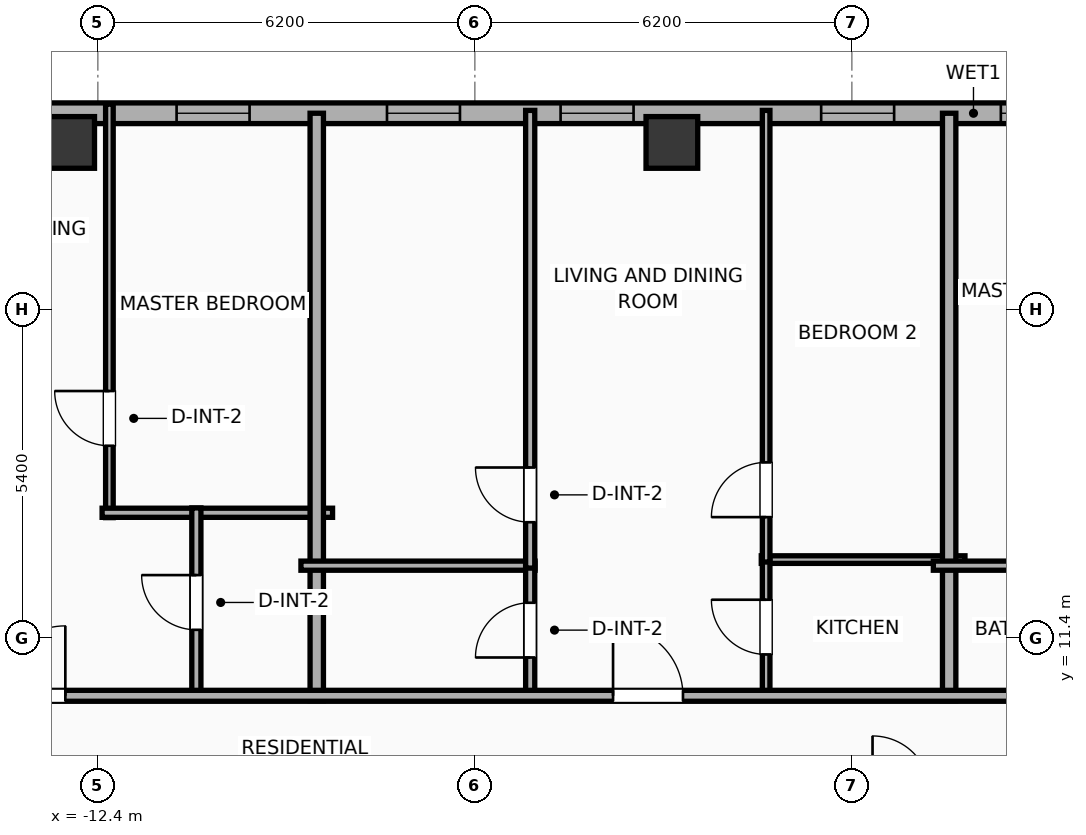
"""IFC4 building model, lengths in metres.
Left out: names, types, materials, properties, quantities, classifications, styles, units other than length and angle.
Written with IfcOpenShell. Run it as: python <this file> out.ifc"""

import sys

from ifc_helpers import new_model, si_unit, direction, frame, frame_2d, origin, origin_2d, place, context, subcontext, project, spatial, rectangle, hollow_rectangle, extrude, element, fill, save


model = new_model("IFC4")
c1 = context("Model", 3, precision=1e-05, world=origin(), true_north=direction((0.0, 1.0)))
c2 = subcontext(c1, "Body", "Model", "MODEL_VIEW")
j1 = project(units=[si_unit("LENGTHUNIT", "METRE"), si_unit("PLANEANGLEUNIT", "RADIAN")], contexts=[c1])
p1 = place(None, origin())
s1 = spatial("IfcSite", under=j1, at=p1, CompositionType="ELEMENT")
p2 = place(p1, origin())
s2 = spatial("IfcBuilding", under=s1, at=p2, CompositionType="ELEMENT")
p3 = place(p2, frame((0.0, 0.0, 250.9)))
s3 = spatial("IfcBuildingStorey", under=s2, at=p3, CompositionType="ELEMENT", Elevation=250.9)
for number, where, z_axis, x_axis in (
    (1, (-2.96, 19.55, 0.0), (0.0, 0.0, 1.0), (1.0, 0.0, 0.0)),
    (2, (-12.88, 19.55, 0.0), (0.0, 0.0, 1.0), (1.0, 0.0, 0.0)),
):
    element("IfcColumn", number, at=place(p3, frame(where, z_axis=z_axis, x_axis=x_axis)), inside=s3, PredefinedType="COLUMN", context=c2, shape_type="SweptSolid", body=[
        extrude(hollow_rectangle(XDim=0.85, YDim=0.85, WallThickness=0.028, at=origin_2d()), origin(), (0.0, 0.0, 1.0), 3.865),
    ])
p4 = place(p3, frame((-22.783, 20.03, 0.0), z_axis=(0.0, 0.0, 1.0), x_axis=(1.0, 0.0, 0.0)))
e3 = element("IfcWall", 3, at=p4, inside=s3, PredefinedType="ELEMENTEDWALL", context=c2, shape_type="SweptSolid", body=[
    extrude(rectangle(XDim=49.566, YDim=0.34, at=frame_2d((24.783, 0.0))), origin(), (0.0, 0.0, 1.0), 2.39),
])
p5 = place(p4, frame((25.233, 0.0, 0.75)))
e4 = element("IfcOpeningElement", 4, at=p5, cuts=e3, PredefinedType="OPENING", context=c2, shape_type="SweptSolid", body=[
    extrude(rectangle(XDim=2.4, YDim=1.45, at=frame_2d((1.2, 0.725))), frame((0.0, 0.18, 0.0), z_axis=(0.0, -1.0, 0.0), x_axis=(1.0, 0.0, 0.0)), (0.0, 0.0, 1.0), 0.36),
])
p6 = place(p4, frame((41.756, 0.0, 0.75)))
e5 = element("IfcOpeningElement", 5, at=p6, cuts=e3, PredefinedType="OPENING", context=c2, shape_type="SweptSolid", body=[
    extrude(rectangle(XDim=2.4, YDim=1.45, at=frame_2d((1.2, 0.725))), frame((0.0, 0.18, 0.0), z_axis=(0.0, -1.0, 0.0), x_axis=(1.0, 0.0, 0.0)), (0.0, 0.0, 1.0), 0.36),
])
p7 = place(p4, frame((1.637, 0.0, 0.55)))
e6 = element("IfcOpeningElement", 6, at=p7, cuts=e3, PredefinedType="OPENING", context=c2, shape_type="SweptSolid", body=[
    extrude(rectangle(XDim=1.2, YDim=1.15, at=frame_2d((0.6, 0.575))), frame((0.0, 0.18, 0.0), z_axis=(0.0, -1.0, 0.0), x_axis=(1.0, 0.0, 0.0)), (0.0, 0.0, 1.0), 0.36),
])
p8 = place(p4, frame((8.019, 0.0, 0.55)))
e7 = element("IfcOpeningElement", 7, at=p8, cuts=e3, PredefinedType="OPENING", context=c2, shape_type="SweptSolid", body=[
    extrude(rectangle(XDim=1.2, YDim=1.15, at=frame_2d((0.6, 0.575))), frame((0.0, 0.18, 0.0), z_axis=(0.0, -1.0, 0.0), x_axis=(1.0, 0.0, 0.0)), (0.0, 0.0, 1.0), 0.36),
])
p9 = place(p4, frame((4.524, 0.0, 0.55)))
e8 = element("IfcOpeningElement", 8, at=p9, cuts=e3, PredefinedType="OPENING", context=c2, shape_type="SweptSolid", body=[
    extrude(rectangle(XDim=1.2, YDim=1.15, at=frame_2d((0.6, 0.575))), frame((0.0, 0.18, 0.0), z_axis=(0.0, -1.0, 0.0), x_axis=(1.0, 0.0, 0.0)), (0.0, 0.0, 1.0), 0.36),
])
p10 = place(p4, frame((11.678, 0.0, 0.55)))
e9 = element("IfcOpeningElement", 9, at=p10, cuts=e3, PredefinedType="OPENING", context=c2, shape_type="SweptSolid", body=[
    extrude(rectangle(XDim=1.2, YDim=1.15, at=frame_2d((0.6, 0.575))), frame((0.0, 0.18, 0.0), z_axis=(0.0, -1.0, 0.0), x_axis=(1.0, 0.0, 0.0)), (0.0, 0.0, 1.0), 0.36),
])
p11 = place(p4, frame((17.993, 0.0, 0.55)))
e10 = element("IfcOpeningElement", 10, at=p11, cuts=e3, PredefinedType="OPENING", context=c2, shape_type="SweptSolid", body=[
    extrude(rectangle(XDim=1.2, YDim=1.15, at=frame_2d((0.6, 0.575))), frame((0.0, 0.18, 0.0), z_axis=(0.0, -1.0, 0.0), x_axis=(1.0, 0.0, 0.0)), (0.0, 0.0, 1.0), 0.36),
])
p12 = place(p4, frame((15.138, 0.0, 0.55)))
e11 = element("IfcOpeningElement", 11, at=p12, cuts=e3, PredefinedType="OPENING", context=c2, shape_type="SweptSolid", body=[
    extrude(rectangle(XDim=1.2, YDim=1.15, at=frame_2d((0.6, 0.575))), frame((0.0, 0.18, 0.0), z_axis=(0.0, -1.0, 0.0), x_axis=(1.0, 0.0, 0.0)), (0.0, 0.0, 1.0), 0.36),
])
p13 = place(p4, frame((22.278, 0.0, 0.55)))
e12 = element("IfcOpeningElement", 12, at=p13, cuts=e3, PredefinedType="OPENING", context=c2, shape_type="SweptSolid", body=[
    extrude(rectangle(XDim=1.2, YDim=1.15, at=frame_2d((0.6, 0.575))), frame((0.0, 0.18, 0.0), z_axis=(0.0, -1.0, 0.0), x_axis=(1.0, 0.0, 0.0)), (0.0, 0.0, 1.0), 0.36),
])
p14 = place(p4, frame((30.384, 0.0, 0.55)))
e13 = element("IfcOpeningElement", 13, at=p14, cuts=e3, PredefinedType="OPENING", context=c2, shape_type="SweptSolid", body=[
    extrude(rectangle(XDim=0.85, YDim=1.15, at=frame_2d((0.425, 0.575))), frame((0.0, 0.18, 0.0), z_axis=(0.0, -1.0, 0.0), x_axis=(1.0, 0.0, 0.0)), (0.0, 0.0, 1.0), 0.36),
])
p15 = place(p4, frame((32.603, 0.0, 0.55)))
e14 = element("IfcOpeningElement", 14, at=p15, cuts=e3, PredefinedType="OPENING", context=c2, shape_type="SweptSolid", body=[
    extrude(rectangle(XDim=1.2, YDim=1.15, at=frame_2d((0.6, 0.575))), frame((0.0, 0.18, 0.0), z_axis=(0.0, -1.0, 0.0), x_axis=(1.0, 0.0, 0.0)), (0.0, 0.0, 1.0), 0.36),
])
p16 = place(p4, frame((37.223, 0.0, 0.55)))
e15 = element("IfcOpeningElement", 15, at=p16, cuts=e3, PredefinedType="OPENING", context=c2, shape_type="SweptSolid", body=[
    extrude(rectangle(XDim=1.2, YDim=1.15, at=frame_2d((0.6, 0.575))), frame((0.0, 0.18, 0.0), z_axis=(0.0, -1.0, 0.0), x_axis=(1.0, 0.0, 0.0)), (0.0, 0.0, 1.0), 0.36),
])
p17 = place(p4, frame((45.099, 0.0, 0.55)))
e16 = element("IfcOpeningElement", 16, at=p17, cuts=e3, PredefinedType="OPENING", context=c2, shape_type="SweptSolid", body=[
    extrude(rectangle(XDim=1.2, YDim=1.15, at=frame_2d((0.6, 0.575))), frame((0.0, 0.18, 0.0), z_axis=(0.0, -1.0, 0.0), x_axis=(1.0, 0.0, 0.0)), (0.0, 0.0, 1.0), 0.36),
])
p18 = place(p4, frame((47.209, 0.0, 0.55)))
e17 = element("IfcOpeningElement", 17, at=p18, cuts=e3, PredefinedType="OPENING", context=c2, shape_type="SweptSolid", body=[
    extrude(rectangle(XDim=1.2, YDim=1.15, at=frame_2d((0.6, 0.575))), frame((0.0, 0.18, 0.0), z_axis=(0.0, -1.0, 0.0), x_axis=(1.0, 0.0, 0.0)), (0.0, 0.0, 1.0), 0.36),
])
p19 = place(p3, frame((-12.21, 13.38, 0.0), z_axis=(0.0, 0.0, 1.0), x_axis=(0.0, 1.0, 0.0)))
e18 = element("IfcWall", 18, at=p19, inside=s3, PredefinedType="PARTITIONING", context=c2, shape_type="SweptSolid", body=[
    extrude(rectangle(XDim=6.8, YDim=0.125, at=frame_2d((3.4, 0.0))), origin(), (0.0, 0.0, 1.0), 2.39),
])
p20 = place(p19, frame((1.182, 0.0, 0.0)))
e19 = element("IfcOpeningElement", 19, at=p20, cuts=e18, PredefinedType="OPENING", context=c2, shape_type="SweptSolid", body=[
    extrude(rectangle(XDim=0.9, YDim=2.05, at=frame_2d((0.45, 1.025))), frame((0.0, 0.073, 0.0), z_axis=(0.0, -1.0, 0.0), x_axis=(1.0, 0.0, 0.0)), (0.0, 0.0, 1.0), 0.145),
])
p21 = place(p3, frame((-12.33, 13.46, 0.0), z_axis=(0.0, 0.0, 1.0), x_axis=(1.0, 0.0, 0.0)))
e20 = element("IfcWall", 20, at=p21, inside=s3, PredefinedType="PLUMBINGWALL", context=c2, shape_type="SweptSolid", body=[
    extrude(rectangle(XDim=3.79, YDim=0.15, at=frame_2d((1.895, 0.0))), origin(), (0.0, 0.0, 1.0), 3.5),
])
p22 = place(p3, frame((-10.78, 10.43, 0.0), z_axis=(0.0, 0.0, 1.0), x_axis=(0.0, 1.0, 0.0)))
e21 = element("IfcWall", 21, at=p22, inside=s3, PredefinedType="PLUMBINGWALL", context=c2, shape_type="SweptSolid", body=[
    extrude(rectangle(XDim=3.11, YDim=0.15, at=frame_2d((1.555, 0.0))), origin(), (0.0, 0.0, 1.0), 3.5),
])
p23 = place(p22, frame((1.105, 0.0, 0.0)))
e22 = element("IfcOpeningElement", 22, at=p23, cuts=e21, PredefinedType="OPENING", context=c2, shape_type="SweptSolid", body=[
    extrude(rectangle(XDim=0.9, YDim=2.05, at=frame_2d((0.45, 1.025))), frame((0.0, 0.085, 0.0), z_axis=(0.0, -1.0, 0.0), x_axis=(1.0, 0.0, 0.0)), (0.0, 0.0, 1.0), 0.17),
])
p24 = place(p3, frame((-8.8, 10.37, 0.0), z_axis=(0.0, 0.0, 1.0), x_axis=(0.0, 1.0, 0.0)))
e23 = element("IfcWall", 23, at=p24, inside=s3, PredefinedType="PARTITIONING", context=c2, shape_type="SweptSolid", body=[
    extrude(rectangle(XDim=9.66, YDim=0.22, at=frame_2d((4.83, 0.0))), origin(), (0.0, 0.0, 1.0), 3.5),
])
p25 = place(p3, frame((-9.06, 12.59, 0.0), z_axis=(0.0, 0.0, 1.0), x_axis=(1.0, 0.0, 0.0)))
e24 = element("IfcWall", 24, at=p25, inside=s3, PredefinedType="PLUMBINGWALL", context=c2, shape_type="SweptSolid", body=[
    extrude(rectangle(XDim=3.85, YDim=0.15, at=frame_2d((1.925, 0.0))), origin(), (0.0, 0.0, 1.0), 3.5),
])
p26 = place(p3, frame((-1.49, 12.69, 0.0), z_axis=(0.0, 0.0, 1.0), x_axis=(1.0, 0.0, 0.0)))
e25 = element("IfcWall", 25, at=p26, inside=s3, PredefinedType="PARTITIONING", context=c2, shape_type="SweptSolid", body=[
    extrude(rectangle(XDim=3.35, YDim=0.125, at=frame_2d((1.675, 0.0))), origin(), (0.0, 0.0, 1.0), 3.5),
])
p27 = place(p3, frame((-5.29, 10.43, 0.0), z_axis=(0.0, 0.0, 1.0), x_axis=(0.0, 1.0, 0.0)))
e26 = element("IfcWall", 26, at=p27, inside=s3, PredefinedType="PLUMBINGWALL", context=c2, shape_type="SweptSolid", body=[
    extrude(rectangle(XDim=2.2, YDim=0.15, at=frame_2d((1.1, 0.0))), origin(), (0.0, 0.0, 1.0), 2.39),
])
p28 = place(p27, frame((0.65, 0.0, 0.0)))
e27 = element("IfcOpeningElement", 27, at=p28, cuts=e26, PredefinedType="OPENING", context=c2, shape_type="SweptSolid", body=[
    extrude(rectangle(XDim=0.9, YDim=2.05, at=frame_2d((0.45, 1.025))), frame((0.0, 0.085, 0.0), z_axis=(0.0, -1.0, 0.0), x_axis=(1.0, 0.0, 0.0)), (0.0, 0.0, 1.0), 0.17),
])
p29 = place(p3, frame((-5.29, 12.55, 0.0), z_axis=(0.0, 0.0, 1.0), x_axis=(0.0, 1.0, 0.0)))
e28 = element("IfcWall", 28, at=p29, inside=s3, PredefinedType="PLUMBINGWALL", context=c2, shape_type="SweptSolid", body=[
    extrude(rectangle(XDim=7.527, YDim=0.15, at=frame_2d((3.763, 0.0))), origin(), (0.0, 0.0, 1.0), 2.39),
])
p30 = place(p29, frame((0.754, 0.0, 0.0)))
e29 = element("IfcOpeningElement", 29, at=p30, cuts=e28, PredefinedType="OPENING", context=c2, shape_type="SweptSolid", body=[
    extrude(rectangle(XDim=0.9, YDim=2.05, at=frame_2d((0.45, 1.025))), frame((0.0, 0.085, 0.0), z_axis=(0.0, -1.0, 0.0), x_axis=(1.0, 0.0, 0.0)), (0.0, 0.0, 1.0), 0.17),
])
p31 = place(p3, frame((-1.41, 10.43, 0.0), z_axis=(0.0, 0.0, 1.0), x_axis=(0.0, 1.0, 0.0)))
e30 = element("IfcWall", 30, at=p31, inside=s3, PredefinedType="PARTITIONING", context=c2, shape_type="SweptSolid", body=[
    extrude(rectangle(XDim=2.3, YDim=0.125, at=frame_2d((1.15, 0.0))), origin(), (0.0, 0.0, 1.0), 3.5),
])
p32 = place(p31, frame((0.7, 0.0, 0.0)))
e31 = element("IfcOpeningElement", 31, at=p32, cuts=e30, PredefinedType="OPENING", context=c2, shape_type="SweptSolid", body=[
    extrude(rectangle(XDim=0.9, YDim=2.05, at=frame_2d((0.45, 1.025))), frame((0.0, 0.073, 0.0), z_axis=(0.0, -1.0, 0.0), x_axis=(1.0, 0.0, 0.0)), (0.0, 0.0, 1.0), 0.145),
])
p33 = place(p3, frame((-1.41, 12.65, 0.0), z_axis=(0.0, 0.0, 1.0), x_axis=(0.0, 1.0, 0.0)))
e32 = element("IfcWall", 32, at=p33, inside=s3, PredefinedType="PARTITIONING", context=c2, shape_type="SweptSolid", body=[
    extrude(rectangle(XDim=7.427, YDim=0.125, at=frame_2d((3.713, 0.0))), origin(), (0.0, 0.0, 1.0), 3.5),
])
p34 = place(p33, frame((0.738, 0.0, 0.0)))
e33 = element("IfcOpeningElement", 33, at=p34, cuts=e32, PredefinedType="OPENING", context=c2, shape_type="SweptSolid", body=[
    extrude(rectangle(XDim=0.9, YDim=2.05, at=frame_2d((0.45, 1.025))), frame((0.0, 0.073, 0.0), z_axis=(0.0, -1.0, 0.0), x_axis=(1.0, 0.0, 0.0)), (0.0, 0.0, 1.0), 0.145),
])
p35 = place(p3, frame((1.6, 10.37, 0.0), z_axis=(0.0, 0.0, 1.0), x_axis=(0.0, 1.0, 0.0)))
e34 = element("IfcWall", 34, at=p35, inside=s3, PredefinedType="PARTITIONING", context=c2, shape_type="SweptSolid", body=[
    extrude(rectangle(XDim=9.66, YDim=0.22, at=frame_2d((4.83, 0.0))), origin(), (0.0, 0.0, 1.0), 3.5),
])
p36 = place(p3, frame((1.34, 12.59, 0.0), z_axis=(0.0, 0.0, 1.0), x_axis=(1.0, 0.0, 0.0)))
e35 = element("IfcWall", 35, at=p36, inside=s3, PredefinedType="PLUMBINGWALL", context=c2, shape_type="SweptSolid", body=[
    extrude(rectangle(XDim=3.792, YDim=0.15, at=frame_2d((1.896, 0.0))), origin(), (0.0, 0.0, 1.0), 3.5),
])
p37 = place(p3, frame((-26.23, 10.45, 0.0), z_axis=(0.0, 0.0, 1.0), x_axis=(1.0, 0.0, 0.0)))
e36 = element("IfcWall", 36, at=p37, inside=s3, PredefinedType="PARTITIONING", context=c2, shape_type="SweptSolid", body=[
    extrude(rectangle(XDim=56.46, YDim=0.18, at=frame_2d((28.23, 0.0))), origin(), (0.0, 0.0, 1.0), 3.5),
])
p38 = place(p37, frame((3.072, 0.0, 0.0)))
e37 = element("IfcOpeningElement", 37, at=p38, cuts=e36, PredefinedType="OPENING", context=c2, shape_type="SweptSolid", body=[
    extrude(rectangle(XDim=1.15, YDim=2.05, at=frame_2d((0.575, 1.025))), frame((0.0, 0.1, 0.0), z_axis=(0.0, -1.0, 0.0), x_axis=(1.0, 0.0, 0.0)), (0.0, 0.0, 1.0), 0.2),
])
p39 = place(p37, frame((12.146, 0.0, 0.0)))
e38 = element("IfcOpeningElement", 38, at=p39, cuts=e36, PredefinedType="OPENING", context=c2, shape_type="SweptSolid", body=[
    extrude(rectangle(XDim=1.15, YDim=2.05, at=frame_2d((0.575, 1.025))), frame((0.0, 0.1, 0.0), z_axis=(0.0, -1.0, 0.0), x_axis=(1.0, 0.0, 0.0)), (0.0, 0.0, 1.0), 0.2),
])
p40 = place(p37, frame((22.302, 0.0, 0.0)))
e39 = element("IfcOpeningElement", 39, at=p40, cuts=e36, PredefinedType="OPENING", context=c2, shape_type="SweptSolid", body=[
    extrude(rectangle(XDim=1.15, YDim=2.05, at=frame_2d((0.575, 1.025))), frame((0.0, 0.1, 0.0), z_axis=(0.0, -1.0, 0.0), x_axis=(1.0, 0.0, 0.0)), (0.0, 0.0, 1.0), 0.2),
])
p41 = place(p37, frame((32.601, 0.0, 0.0)))
e40 = element("IfcOpeningElement", 40, at=p41, cuts=e36, PredefinedType="OPENING", context=c2, shape_type="SweptSolid", body=[
    extrude(rectangle(XDim=1.15, YDim=2.05, at=frame_2d((0.575, 1.025))), frame((0.0, 0.1, 0.0), z_axis=(0.0, -1.0, 0.0), x_axis=(1.0, 0.0, 0.0)), (0.0, 0.0, 1.0), 0.2),
])
p42 = place(p37, frame((40.941, 0.0, 0.0)))
e41 = element("IfcOpeningElement", 41, at=p42, cuts=e36, PredefinedType="OPENING", context=c2, shape_type="SweptSolid", body=[
    extrude(rectangle(XDim=0.9, YDim=2.05, at=frame_2d((0.45, 1.025))), frame((0.0, 0.1, 0.0), z_axis=(0.0, -1.0, 0.0), x_axis=(1.0, 0.0, 0.0)), (0.0, 0.0, 1.0), 0.2),
])
p43 = place(p37, frame((45.559, 0.0, 0.0)))
e42 = element("IfcOpeningElement", 42, at=p43, cuts=e36, PredefinedType="OPENING", context=c2, shape_type="SweptSolid", body=[
    extrude(rectangle(XDim=1.15, YDim=2.05, at=frame_2d((0.575, 1.025))), frame((0.0, 0.1, 0.0), z_axis=(0.0, -1.0, 0.0), x_axis=(1.0, 0.0, 0.0)), (0.0, 0.0, 1.0), 0.2),
])
p44 = place(p37, frame((53.125, 0.0, 0.0)))
e43 = element("IfcOpeningElement", 43, at=p44, cuts=e36, PredefinedType="OPENING", context=c2, shape_type="SweptSolid", body=[
    extrude(rectangle(XDim=0.9, YDim=2.05, at=frame_2d((0.45, 1.025))), frame((0.0, 0.1, 0.0), z_axis=(0.0, -1.0, 0.0), x_axis=(1.0, 0.0, 0.0)), (0.0, 0.0, 1.0), 0.2),
])
p45 = place(p5, origin())
e44 = element("IfcWindow", 44, at=p45, inside=s3, PartitioningType="SINGLE_PANEL", PredefinedType="WINDOW", context=c2, shape_type="SweptSolid", body=[
    extrude(rectangle(XDim=2.4, YDim=1.45, at=frame_2d((1.2, 0.725))), frame((0.0, 0.03, 0.0), z_axis=(0.0, -1.0, 0.0), x_axis=(1.0, 0.0, 0.0)), (0.0, 0.0, 1.0), 0.06),
])
fill(e4, e44)
p46 = place(p10, origin())
e45 = element("IfcWindow", 45, at=p46, inside=s3, PartitioningType="SINGLE_PANEL", PredefinedType="WINDOW", context=c2, shape_type="SweptSolid", body=[
    extrude(rectangle(XDim=1.2, YDim=1.15, at=frame_2d((0.6, 0.575))), frame((0.0, 0.03, 0.0), z_axis=(0.0, -1.0, 0.0), x_axis=(1.0, 0.0, 0.0)), (0.0, 0.0, 1.0), 0.06),
])
fill(e9, e45)
p47 = place(p11, origin())
e46 = element("IfcWindow", 46, at=p47, inside=s3, PartitioningType="SINGLE_PANEL", PredefinedType="WINDOW", context=c2, shape_type="SweptSolid", body=[
    extrude(rectangle(XDim=1.2, YDim=1.15, at=frame_2d((0.6, 0.575))), frame((0.0, 0.03, 0.0), z_axis=(0.0, -1.0, 0.0), x_axis=(1.0, 0.0, 0.0)), (0.0, 0.0, 1.0), 0.06),
])
fill(e10, e46)
p48 = place(p12, origin())
e47 = element("IfcWindow", 47, at=p48, inside=s3, PartitioningType="SINGLE_PANEL", PredefinedType="WINDOW", context=c2, shape_type="SweptSolid", body=[
    extrude(rectangle(XDim=1.2, YDim=1.15, at=frame_2d((0.6, 0.575))), frame((0.0, 0.03, 0.0), z_axis=(0.0, -1.0, 0.0), x_axis=(1.0, 0.0, 0.0)), (0.0, 0.0, 1.0), 0.06),
])
fill(e11, e47)
p49 = place(p13, origin())
e48 = element("IfcWindow", 48, at=p49, inside=s3, PartitioningType="SINGLE_PANEL", PredefinedType="WINDOW", context=c2, shape_type="SweptSolid", body=[
    extrude(rectangle(XDim=1.2, YDim=1.15, at=frame_2d((0.6, 0.575))), frame((0.0, 0.03, 0.0), z_axis=(0.0, -1.0, 0.0), x_axis=(1.0, 0.0, 0.0)), (0.0, 0.0, 1.0), 0.06),
])
fill(e12, e48)
p50 = place(p20, origin())
e49 = element("IfcDoor", 49, at=p50, inside=s3, OperationType="SINGLE_SWING_RIGHT", PredefinedType="DOOR", context=c2, shape_type="SweptSolid", body=[
    extrude(rectangle(XDim=0.9, YDim=2.05, at=frame_2d((0.45, 1.025))), frame((0.0, 0.025, 0.0), z_axis=(0.0, -1.0, 0.0), x_axis=(1.0, 0.0, 0.0)), (0.0, 0.0, 1.0), 0.05),
])
fill(e19, e49)
p51 = place(p23, origin())
e50 = element("IfcDoor", 50, at=p51, inside=s3, OperationType="SINGLE_SWING_RIGHT", PredefinedType="DOOR", context=c2, shape_type="SweptSolid", body=[
    extrude(rectangle(XDim=0.9, YDim=2.05, at=frame_2d((0.45, 1.025))), frame((0.0, 0.025, 0.0), z_axis=(0.0, -1.0, 0.0), x_axis=(1.0, 0.0, 0.0)), (0.0, 0.0, 1.0), 0.05),
])
fill(e22, e50)
p52 = place(p28, origin())
e51 = element("IfcDoor", 51, at=p52, inside=s3, OperationType="SINGLE_SWING_LEFT", PredefinedType="DOOR", context=c2, shape_type="SweptSolid", body=[
    extrude(rectangle(XDim=0.9, YDim=2.05, at=frame_2d((0.45, 1.025))), frame((0.0, 0.025, 0.0), z_axis=(0.0, -1.0, 0.0), x_axis=(1.0, 0.0, 0.0)), (0.0, 0.0, 1.0), 0.05),
])
fill(e27, e51)
p53 = place(p30, origin())
e52 = element("IfcDoor", 52, at=p53, inside=s3, OperationType="SINGLE_SWING_RIGHT", PredefinedType="DOOR", context=c2, shape_type="SweptSolid", body=[
    extrude(rectangle(XDim=0.9, YDim=2.05, at=frame_2d((0.45, 1.025))), frame((0.0, 0.025, 0.0), z_axis=(0.0, -1.0, 0.0), x_axis=(1.0, 0.0, 0.0)), (0.0, 0.0, 1.0), 0.05),
])
fill(e29, e52)
p54 = place(p32, origin())
e53 = element("IfcDoor", 53, at=p54, inside=s3, OperationType="SINGLE_SWING_RIGHT", PredefinedType="DOOR", context=c2, shape_type="SweptSolid", body=[
    extrude(rectangle(XDim=0.9, YDim=2.05, at=frame_2d((0.45, 1.025))), frame((0.0, 0.025, 0.0), z_axis=(0.0, -1.0, 0.0), x_axis=(1.0, 0.0, 0.0)), (0.0, 0.0, 1.0), 0.05),
])
fill(e31, e53)
p55 = place(p34, origin())
e54 = element("IfcDoor", 54, at=p55, inside=s3, OperationType="SINGLE_SWING_LEFT", PredefinedType="DOOR", context=c2, shape_type="SweptSolid", body=[
    extrude(rectangle(XDim=0.9, YDim=2.05, at=frame_2d((0.45, 1.025))), frame((0.0, 0.025, 0.0), z_axis=(0.0, -1.0, 0.0), x_axis=(1.0, 0.0, 0.0)), (0.0, 0.0, 1.0), 0.05),
])
fill(e33, e54)
p56 = place(p39, origin())
e55 = element("IfcDoor", 55, at=p56, inside=s3, OperationType="SINGLE_SWING_RIGHT", PredefinedType="DOOR", context=c2, shape_type="SweptSolid", body=[
    extrude(rectangle(XDim=1.15, YDim=2.05, at=frame_2d((0.575, 1.025))), frame((0.0, 0.025, 0.0), z_axis=(0.0, -1.0, 0.0), x_axis=(1.0, 0.0, 0.0)), (0.0, 0.0, 1.0), 0.05),
])
fill(e38, e55)
p57 = place(p40, origin())
e56 = element("IfcDoor", 56, at=p57, inside=s3, OperationType="SINGLE_SWING_LEFT", PredefinedType="DOOR", context=c2, shape_type="SweptSolid", body=[
    extrude(rectangle(XDim=1.15, YDim=2.05, at=frame_2d((0.575, 1.025))), frame((0.0, 0.025, 0.0), z_axis=(0.0, -1.0, 0.0), x_axis=(1.0, 0.0, 0.0)), (0.0, 0.0, 1.0), 0.05),
])
fill(e39, e56)
save(model, sys.argv[1])
